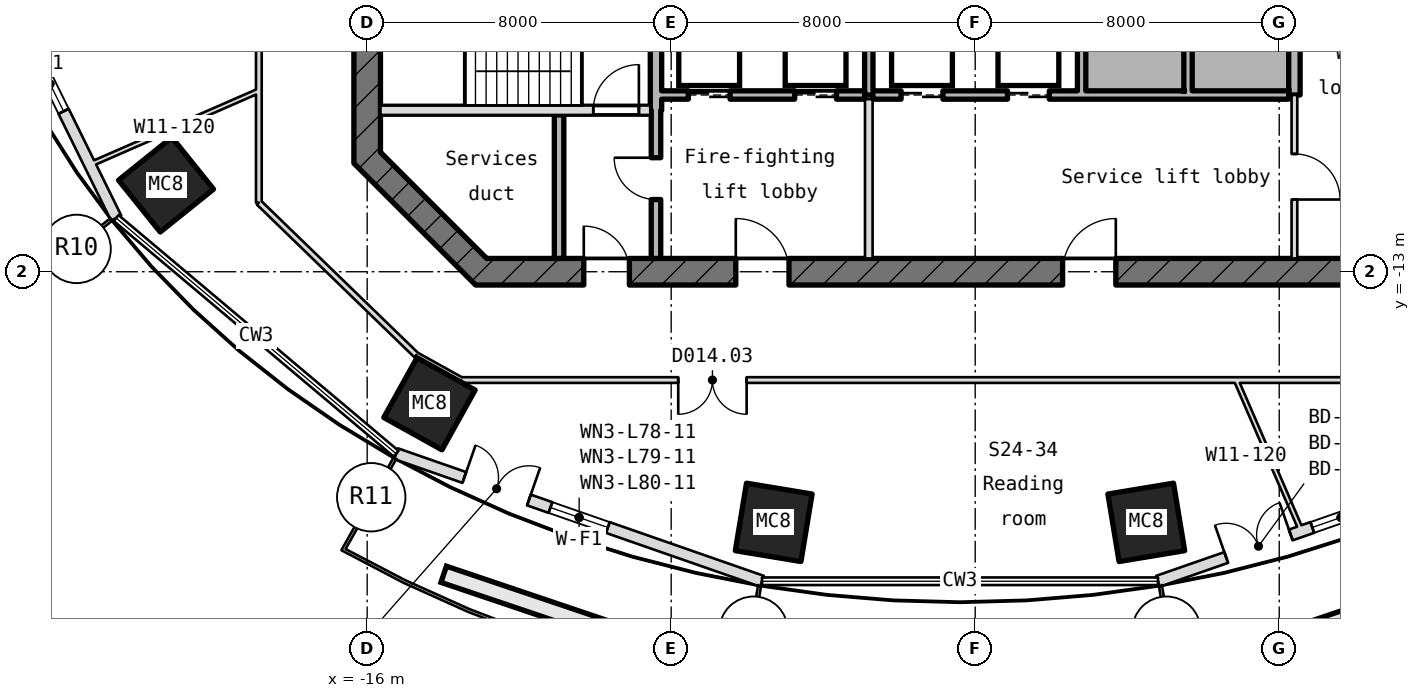
"""IFC4 building model, lengths in metres.
Left out: names, types, materials, properties, quantities, classifications, styles, units other than length and angle.
Written with IfcOpenShell. Run it as: python <this file> out.ifc"""

import sys

from ifc_helpers import new_model, si_unit, direction, frame, frame_2d, origin, origin_2d, place, context, subcontext, project, spatial, rectangle, hollow_rectangle, extrude, element, fill, save


model = new_model("IFC4")
c1 = context("Model", 3, precision=1e-05, world=origin(), true_north=direction((0.0, 1.0)))
c2 = subcontext(c1, "Body", "Model", "MODEL_VIEW")
j1 = project(units=[si_unit("LENGTHUNIT", "METRE"), si_unit("PLANEANGLEUNIT", "RADIAN")], contexts=[c1])
p1 = place(None, origin())
s1 = spatial("IfcSite", under=j1, at=p1, CompositionType="ELEMENT")
p2 = place(p1, origin())
s2 = spatial("IfcBuilding", under=s1, at=p2, CompositionType="ELEMENT")
p3 = place(p2, frame((0.0, 0.0, 346.75)))
s3 = spatial("IfcBuildingStorey", under=s2, at=p3, CompositionType="ELEMENT", Elevation=346.75)
for number, where, z_axis, x_axis in (
    (1, (-21.292, -10.709, -0.18), (0.0, 0.0, 1.0), (-0.626, 0.78, 0.0)),
    (2, (-14.36, -16.474, -0.18), (0.0, 0.0, 1.0), (-0.874, 0.486, 0.0)),
    (3, (-5.302, -19.594, -0.18), (0.0, 0.0, 1.0), (-0.987, 0.163, 0.0)),
    (4, (4.502, -19.594, -0.18), (0.0, 0.0, 1.0), (-0.987, -0.163, 0.0)),
):
    element("IfcColumn", number, at=place(p3, frame(where, z_axis=z_axis, x_axis=x_axis)), inside=s3, PredefinedType="COLUMN", context=c2, shape_type="SweptSolid", body=[
        extrude(hollow_rectangle(XDim=1.75, YDim=1.8, WallThickness=0.055, at=origin_2d()), origin(), (0.0, 0.0, 1.0), 4.15),
    ])
p4 = place(p3, frame((-26.594, -3.485, 0.0), z_axis=(0.0, 0.0, 1.0), x_axis=(0.441581239579, -0.897221270842, 0.0)))
e5 = element("IfcWall", 5, at=p4, inside=s3, PredefinedType="SOLIDWALL", context=c2, shape_type="SweptSolid", body=[
    extrude(rectangle(XDim=9.03, YDim=0.3, at=frame_2d((4.515, 0.0))), origin(), (0.0, 0.0, 1.0), 3.97),
])
p5 = place(p4, frame((1.9, 0.0, 0.0)))
e6 = element("IfcOpeningElement", 6, at=p5, cuts=e5, PredefinedType="OPENING", context=c2, shape_type="SweptSolid", body=[
    extrude(rectangle(XDim=1.8, YDim=2.4, at=frame_2d((0.9, 1.2))), frame((0.0, 0.16, 0.0), z_axis=(0.0, -1.0, 0.0), x_axis=(1.0, 0.0, 0.0)), (0.0, 0.0, 1.0), 0.32),
])
p6 = place(p4, frame((4.3, 0.0, 0.9)))
e7 = element("IfcOpeningElement", 7, at=p6, cuts=e5, PredefinedType="OPENING", context=c2, shape_type="SweptSolid", body=[
    extrude(rectangle(XDim=1.6, YDim=1.5, at=frame_2d((0.8, 0.75))), frame((0.0, 0.16, 0.0), z_axis=(0.0, -1.0, 0.0), x_axis=(1.0, 0.0, 0.0)), (0.0, 0.0, 1.0), 0.32),
])
p7 = place(p3, frame((-15.238, -17.788, 0.0), z_axis=(0.0, 0.0, 1.0), x_axis=(0.944272378507, -0.329165118428, 0.0)))
e8 = element("IfcWall", 8, at=p7, inside=s3, PredefinedType="SOLIDWALL", context=c2, shape_type="SweptSolid", body=[
    extrude(rectangle(XDim=10.195, YDim=0.3, at=frame_2d((5.098, 0.0))), origin(), (0.0, 0.0, 1.0), 3.97),
])
p8 = place(p7, frame((1.9, 0.0, 0.0)))
e9 = element("IfcOpeningElement", 9, at=p8, cuts=e8, PredefinedType="OPENING", context=c2, shape_type="SweptSolid", body=[
    extrude(rectangle(XDim=1.8, YDim=2.4, at=frame_2d((0.9, 1.2))), frame((0.0, 0.16, 0.0), z_axis=(0.0, -1.0, 0.0), x_axis=(1.0, 0.0, 0.0)), (0.0, 0.0, 1.0), 0.32),
])
p9 = place(p7, frame((4.3, 0.0, 0.9)))
e10 = element("IfcOpeningElement", 10, at=p9, cuts=e8, PredefinedType="OPENING", context=c2, shape_type="SweptSolid", body=[
    extrude(rectangle(XDim=1.6, YDim=1.5, at=frame_2d((0.8, 0.75))), frame((0.0, 0.16, 0.0), z_axis=(0.0, -1.0, 0.0), x_axis=(1.0, 0.0, 0.0)), (0.0, 0.0, 1.0), 0.32),
])
p10 = place(p3, frame((4.81, -21.144, 0.0), z_axis=(0.0, 0.0, 1.0), x_axis=(0.944274972987, 0.329157675576, 0.0)))
e11 = element("IfcWall", 11, at=p10, inside=s3, PredefinedType="SOLIDWALL", context=c2, shape_type="SweptSolid", body=[
    extrude(rectangle(XDim=10.196, YDim=0.3, at=frame_2d((5.098, 0.0))), origin(), (0.0, 0.0, 1.0), 3.97),
])
p11 = place(p10, frame((1.9, 0.0, 0.0)))
e12 = element("IfcOpeningElement", 12, at=p11, cuts=e11, PredefinedType="OPENING", context=c2, shape_type="SweptSolid", body=[
    extrude(rectangle(XDim=1.8, YDim=2.4, at=frame_2d((0.9, 1.2))), frame((0.0, 0.16, 0.0), z_axis=(0.0, -1.0, 0.0), x_axis=(1.0, 0.0, 0.0)), (0.0, 0.0, 1.0), 0.32),
])
p12 = place(p10, frame((4.3, 0.0, 0.9)))
e13 = element("IfcOpeningElement", 13, at=p12, cuts=e11, PredefinedType="OPENING", context=c2, shape_type="SweptSolid", body=[
    extrude(rectangle(XDim=1.6, YDim=1.5, at=frame_2d((0.8, 0.75))), frame((0.0, 0.16, 0.0), z_axis=(0.0, -1.0, 0.0), x_axis=(1.0, 0.0, 0.0)), (0.0, 0.0, 1.0), 0.32),
])
p13 = place(p3, frame((-16.0, 10.145, -0.18), z_axis=(0.0, 0.0, 1.0), x_axis=(0.0, -1.0, 0.0)))
e14 = element("IfcWall", 14, at=p13, inside=s3, PredefinedType="SHEAR", context=c2, shape_type="SweptSolid", body=[
    extrude(rectangle(XDim=20.29, YDim=0.7, at=frame_2d((10.145, 0.0))), origin(), (0.0, 0.0, 1.0), 4.15),
])
p14 = place(p13, frame((8.945, 0.0, 0.18)))
e15 = element("IfcOpeningElement", 15, at=p14, cuts=e14, PredefinedType="OPENING", context=c2, shape_type="SweptSolid", body=[
    extrude(rectangle(XDim=2.4, YDim=2.1, at=frame_2d((1.2, 1.05))), frame((0.0, 0.36, 0.0), z_axis=(0.0, -1.0, 0.0), x_axis=(1.0, 0.0, 0.0)), (0.0, 0.0, 1.0), 0.72),
])
p15 = place(p13, frame((5.545, 0.0, 0.18)))
e16 = element("IfcOpeningElement", 16, at=p15, cuts=e14, PredefinedType="OPENING", context=c2, shape_type="SweptSolid", body=[
    extrude(rectangle(XDim=1.2, YDim=2.1, at=frame_2d((0.6, 1.05))), frame((0.0, 0.36, 0.0), z_axis=(0.0, -1.0, 0.0), x_axis=(1.0, 0.0, 0.0)), (0.0, 0.0, 1.0), 0.72),
])
p16 = place(p3, frame((-16.103, -9.897, -0.18), z_axis=(0.0, 0.0, 1.0), x_axis=(0.707106781187, -0.707106781187, 0.0)))
e17 = element("IfcWall", 17, at=p16, inside=s3, PredefinedType="SHEAR", context=c2, shape_type="SweptSolid", body=[
    extrude(rectangle(XDim=4.533, YDim=0.7, at=frame_2d((2.266, 0.0))), origin(), (0.0, 0.0, 1.0), 4.15),
])
p17 = place(p3, frame((-13.145, -13.0, -0.18), z_axis=(0.0, 0.0, 1.0), x_axis=(1.0, 0.0, 0.0)))
e18 = element("IfcWall", 18, at=p17, inside=s3, PredefinedType="SHEAR", context=c2, shape_type="SweptSolid", body=[
    extrude(rectangle(XDim=26.29, YDim=0.7, at=frame_2d((13.145, 0.0))), origin(), (0.0, 0.0, 1.0), 4.15),
])
p18 = place(p17, frame((2.845, 0.0, 0.18)))
e19 = element("IfcOpeningElement", 19, at=p18, cuts=e18, PredefinedType="OPENING", context=c2, shape_type="SweptSolid", body=[
    extrude(rectangle(XDim=1.2, YDim=2.1, at=frame_2d((0.6, 1.05))), frame((0.0, 0.36, 0.0), z_axis=(0.0, -1.0, 0.0), x_axis=(1.0, 0.0, 0.0)), (0.0, 0.0, 1.0), 0.72),
])
p19 = place(p17, frame((6.845, 0.0, 0.18)))
e20 = element("IfcOpeningElement", 20, at=p19, cuts=e18, PredefinedType="OPENING", context=c2, shape_type="SweptSolid", body=[
    extrude(rectangle(XDim=1.4, YDim=2.1, at=frame_2d((0.7, 1.05))), frame((0.0, 0.36, 0.0), z_axis=(0.0, -1.0, 0.0), x_axis=(1.0, 0.0, 0.0)), (0.0, 0.0, 1.0), 0.72),
])
p20 = place(p17, frame((15.445, 0.0, 0.18)))
e21 = element("IfcOpeningElement", 21, at=p20, cuts=e18, PredefinedType="OPENING", context=c2, shape_type="SweptSolid", body=[
    extrude(rectangle(XDim=1.4, YDim=2.1, at=frame_2d((0.7, 1.05))), frame((0.0, 0.36, 0.0), z_axis=(0.0, -1.0, 0.0), x_axis=(1.0, 0.0, 0.0)), (0.0, 0.0, 1.0), 0.72),
])
p21 = place(p3, frame((-15.65, -8.75, -0.18), z_axis=(0.0, 0.0, 1.0), x_axis=(1.0, 0.0, 0.0)))
e22 = element("IfcWall", 22, at=p21, inside=s3, PredefinedType="SHEAR", context=c2, shape_type="SweptSolid", body=[
    extrude(rectangle(XDim=7.1, YDim=0.25, at=frame_2d((3.55, 0.0))), origin(), (0.0, 0.0, 1.0), 4.15),
])
p22 = place(p21, frame((5.6, 0.0, 0.18)))
e23 = element("IfcOpeningElement", 23, at=p22, cuts=e22, PredefinedType="OPENING", context=c2, shape_type="SweptSolid", body=[
    extrude(rectangle(XDim=1.2, YDim=2.1, at=frame_2d((0.6, 1.05))), frame((0.0, 0.135, 0.0), z_axis=(0.0, -1.0, 0.0), x_axis=(1.0, 0.0, 0.0)), (0.0, 0.0, 1.0), 0.27),
])
p23 = place(p3, frame((-8.25, -8.35, 0.0), z_axis=(0.0, 0.0, 1.0), x_axis=(1.0, 0.0, 0.0)))
e24 = element("IfcWall", 24, at=p23, inside=s3, PredefinedType="STANDARD", context=c2, shape_type="SweptSolid", body=[
    extrude(rectangle(XDim=5.34, YDim=0.22, at=frame_2d((2.67, 0.0))), origin(), (0.0, 0.0, 1.0), 3.97),
])
p24 = place(p23, frame((0.7, 0.0, 0.0)))
e25 = element("IfcOpeningElement", 25, at=p24, cuts=e24, PredefinedType="OPENING", context=c2, shape_type="SweptSolid", body=[
    extrude(rectangle(XDim=1.1, YDim=2.1, at=frame_2d((0.55, 1.05))), frame((0.0, 0.12, 0.0), z_axis=(0.0, -1.0, 0.0), x_axis=(1.0, 0.0, 0.0)), (0.0, 0.0, 1.0), 0.24),
])
p25 = place(p23, frame((3.5, 0.0, 0.0)))
e26 = element("IfcOpeningElement", 26, at=p25, cuts=e24, PredefinedType="OPENING", context=c2, shape_type="SweptSolid", body=[
    extrude(rectangle(XDim=1.1, YDim=2.1, at=frame_2d((0.55, 1.05))), frame((0.0, 0.12, 0.0), z_axis=(0.0, -1.0, 0.0), x_axis=(1.0, 0.0, 0.0)), (0.0, 0.0, 1.0), 0.24),
])
p26 = place(p3, frame((-2.69, -8.35, 0.0), z_axis=(0.0, 0.0, 1.0), x_axis=(1.0, 0.0, 0.0)))
e27 = element("IfcWall", 27, at=p26, inside=s3, PredefinedType="STANDARD", context=c2, shape_type="SweptSolid", body=[
    extrude(rectangle(XDim=10.94, YDim=0.22, at=frame_2d((5.47, 0.0))), origin(), (0.0, 0.0, 1.0), 3.97),
])
p27 = place(p26, frame((0.74, 0.0, 0.0)))
e28 = element("IfcOpeningElement", 28, at=p27, cuts=e27, PredefinedType="OPENING", context=c2, shape_type="SweptSolid", body=[
    extrude(rectangle(XDim=1.1, YDim=2.1, at=frame_2d((0.55, 1.05))), frame((0.0, 0.12, 0.0), z_axis=(0.0, -1.0, 0.0), x_axis=(1.0, 0.0, 0.0)), (0.0, 0.0, 1.0), 0.24),
])
p28 = place(p26, frame((3.54, 0.0, 0.0)))
e29 = element("IfcOpeningElement", 29, at=p28, cuts=e27, PredefinedType="OPENING", context=c2, shape_type="SweptSolid", body=[
    extrude(rectangle(XDim=1.1, YDim=2.1, at=frame_2d((0.55, 1.05))), frame((0.0, 0.12, 0.0), z_axis=(0.0, -1.0, 0.0), x_axis=(1.0, 0.0, 0.0)), (0.0, 0.0, 1.0), 0.24),
])
p29 = place(p3, frame((-10.95, -12.65, 0.0), z_axis=(0.0, 0.0, 1.0), x_axis=(0.0, 1.0, 0.0)))
e30 = element("IfcWall", 30, at=p29, inside=s3, PredefinedType="STANDARD", context=c2, shape_type="SweptSolid", body=[
    extrude(rectangle(XDim=3.775, YDim=0.25, at=frame_2d((1.887, 0.0))), origin(), (0.0, 0.0, 1.0), 3.97),
])
p30 = place(p3, frame((-8.4, -12.65, 0.0), z_axis=(0.0, 0.0, 1.0), x_axis=(0.0, 1.0, 0.0)))
e31 = element("IfcWall", 31, at=p30, inside=s3, PredefinedType="STANDARD", context=c2, shape_type="SweptSolid", body=[
    extrude(rectangle(XDim=3.9, YDim=0.25, at=frame_2d((1.95, 0.0))), origin(), (0.0, 0.0, 1.0), 3.97),
])
p31 = place(p30, frame((1.55, 0.0, 0.0)))
e32 = element("IfcOpeningElement", 32, at=p31, cuts=e31, PredefinedType="OPENING", context=c2, shape_type="SweptSolid", body=[
    extrude(rectangle(XDim=1.1, YDim=2.1, at=frame_2d((0.55, 1.05))), frame((0.0, 0.135, 0.0), z_axis=(0.0, -1.0, 0.0), x_axis=(1.0, 0.0, 0.0)), (0.0, 0.0, 1.0), 0.27),
])
p32 = place(p3, frame((-8.4, -8.75, -0.18), z_axis=(0.0, 0.0, 1.0), x_axis=(0.0, 1.0, 0.0)))
e33 = element("IfcWall", 33, at=p32, inside=s3, PredefinedType="SHEAR", context=c2, shape_type="SweptSolid", body=[
    extrude(rectangle(XDim=4.175, YDim=0.3, at=frame_2d((2.087, 0.0))), origin(), (0.0, 0.0, 1.0), 4.15),
])
p33 = place(p3, frame((-2.8, -12.65, 0.0), z_axis=(0.0, 0.0, 1.0), x_axis=(0.0, 1.0, 0.0)))
e34 = element("IfcWall", 34, at=p33, inside=s3, PredefinedType="PARTITIONING", context=c2, shape_type="SweptSolid", body=[
    extrude(rectangle(XDim=4.19, YDim=0.2, at=frame_2d((2.095, 0.0))), origin(), (0.0, 0.0, 1.0), 3.97),
])
p34 = place(p3, frame((-2.8, -8.35, 0.0), z_axis=(0.0, 0.0, 1.0), x_axis=(0.0, 1.0, 0.0)))
e35 = element("IfcWall", 35, at=p34, inside=s3, PredefinedType="STANDARD", context=c2, shape_type="SweptSolid", body=[
    extrude(rectangle(XDim=2.89, YDim=0.22, at=frame_2d((1.445, 0.0))), origin(), (0.0, 0.0, 1.0), 3.97),
])
for number, where, z_axis, x_axis in (
    (36, (2.8, -8.24, 0.0), (0.0, 0.0, 1.0), (0.0, 1.0, 0.0)),
    (37, (5.6, -8.24, 0.0), (0.0, 0.0, 1.0), (0.0, 1.0, 0.0)),
):
    element("IfcWall", number, at=place(p3, frame(where, z_axis=z_axis, x_axis=x_axis)), inside=s3, PredefinedType="STANDARD", context=c2, shape_type="SweptSolid", body=[
        extrude(rectangle(XDim=2.78, YDim=0.22, at=frame_2d((1.39, 0.0))), origin(), (0.0, 0.0, 1.0), 3.97),
    ])
p35 = place(p3, frame((8.4, -12.65, 0.0), z_axis=(0.0, 0.0, 1.0), x_axis=(0.0, 1.0, 0.0)))
e38 = element("IfcWall", 38, at=p35, inside=s3, PredefinedType="PARTITIONING", context=c2, shape_type="SweptSolid", body=[
    extrude(rectangle(XDim=4.3, YDim=0.15, at=frame_2d((2.15, 0.0))), origin(), (0.0, 0.0, 1.0), 3.97),
])
p36 = place(p35, frame((1.55, 0.0, 0.0)))
e39 = element("IfcOpeningElement", 39, at=p36, cuts=e38, PredefinedType="OPENING", context=c2, shape_type="SweptSolid", body=[
    extrude(rectangle(XDim=1.2, YDim=2.1, at=frame_2d((0.6, 1.05))), frame((0.0, 0.085, 0.0), z_axis=(0.0, -1.0, 0.0), x_axis=(1.0, 0.0, 0.0)), (0.0, 0.0, 1.0), 0.17),
])
p37 = place(p3, frame((8.4, -8.35, -0.18), z_axis=(0.0, 0.0, 1.0), x_axis=(0.0, 1.0, 0.0)))
e40 = element("IfcWall", 40, at=p37, inside=s3, PredefinedType="SHEAR", context=c2, shape_type="SweptSolid", body=[
    extrude(rectangle(XDim=5.85, YDim=0.3, at=frame_2d((2.925, 0.0))), origin(), (0.0, 0.0, 1.0), 4.15),
])
p38 = place(p3, frame((-18.85, -11.18, 0.0), z_axis=(0.0, 0.0, 1.0), x_axis=(0.0, 1.0, 0.0)))
e41 = element("IfcWall", 41, at=p38, inside=s3, PredefinedType="PARTITIONING", context=c2, shape_type="SweptSolid", body=[
    extrude(rectangle(XDim=22.361, YDim=0.15, at=frame_2d((11.18, 0.0))), origin(), (0.0, 0.0, 1.0), 3.97),
])
p39 = place(p38, frame((9.02, 0.0, 0.0)))
e42 = element("IfcOpeningElement", 42, at=p39, cuts=e41, PredefinedType="OPENING", context=c2, shape_type="SweptSolid", body=[
    extrude(rectangle(XDim=0.95, YDim=2.1, at=frame_2d((0.475, 1.05))), frame((0.0, 0.085, 0.0), z_axis=(0.0, -1.0, 0.0), x_axis=(1.0, 0.0, 0.0)), (0.0, 0.0, 1.0), 0.17),
])
p40 = place(p3, frame((-18.85, -8.239, 0.0), z_axis=(0.0, 0.0, 1.0), x_axis=(-0.916287746966, -0.400520617148, 0.0)))
e43 = element("IfcWall", 43, at=p40, inside=s3, PredefinedType="PARTITIONING", context=c2, shape_type="SweptSolid", body=[
    extrude(rectangle(XDim=4.853, YDim=0.12, at=frame_2d((2.427, 0.0))), origin(), (0.0, 0.0, 1.0), 3.97),
])
p41 = place(p3, frame((-14.707, -15.195, 0.0), z_axis=(0.0, 0.0, 1.0), x_axis=(-0.718211802801, 0.695824551391, 0.0)))
e44 = element("IfcWall", 44, at=p41, inside=s3, PredefinedType="PARTITIONING", context=c2, shape_type="SweptSolid", body=[
    extrude(rectangle(XDim=5.769, YDim=0.15, at=frame_2d((2.885, 0.0))), origin(), (0.0, 0.0, 1.0), 3.97),
])
p42 = place(p3, frame((-13.528, -15.85, 0.0), z_axis=(0.0, 0.0, 1.0), x_axis=(-0.874029209117, 0.485873380224, 0.0)))
e45 = element("IfcWall", 45, at=p42, inside=s3, PredefinedType="PARTITIONING", context=c2, shape_type="SweptSolid", body=[
    extrude(rectangle(XDim=1.349, YDim=0.15, at=frame_2d((0.675, 0.0))), origin(), (0.0, 0.0, 1.0), 3.97),
])
p43 = place(p3, frame((6.865, -15.85, 0.0), z_axis=(0.0, 0.0, 1.0), x_axis=(0.397444614723, -0.917626164747, 0.0)))
e46 = element("IfcWall", 46, at=p43, inside=s3, PredefinedType="PARTITIONING", context=c2, shape_type="SweptSolid", body=[
    extrude(rectangle(XDim=4.334, YDim=0.12, at=frame_2d((2.167, 0.0))), origin(), (0.0, 0.0, 1.0), 3.97),
])
p44 = place(p3, frame((12.728, -15.85, 0.0), z_axis=(0.0, 0.0, 1.0), x_axis=(-1.0, 0.0, 0.0)))
e47 = element("IfcWall", 47, at=p44, inside=s3, PredefinedType="PARTITIONING", context=c2, shape_type="SweptSolid", body=[
    extrude(rectangle(XDim=26.255, YDim=0.15, at=frame_2d((13.127, 0.0))), origin(), (0.0, 0.0, 1.0), 3.97),
])
p45 = place(p44, frame((18.742, 0.0, 0.0)))
e48 = element("IfcOpeningElement", 48, at=p45, cuts=e47, PredefinedType="OPENING", context=c2, shape_type="SweptSolid", body=[
    extrude(rectangle(XDim=1.8, YDim=2.1, at=frame_2d((0.9, 1.05))), frame((0.0, 0.085, 0.0), z_axis=(0.0, -1.0, 0.0), x_axis=(1.0, 0.0, 0.0)), (0.0, 0.0, 1.0), 0.17),
])
p46 = place(p6, origin())
e49 = element("IfcWindow", 49, at=p46, inside=s3, PartitioningType="SINGLE_PANEL", PredefinedType="WINDOW", context=c2, shape_type="SweptSolid", body=[
    extrude(rectangle(XDim=1.6, YDim=1.5, at=frame_2d((0.8, 0.75))), frame((0.0, 0.03, 0.0), z_axis=(0.0, -1.0, 0.0), x_axis=(1.0, 0.0, 0.0)), (0.0, 0.0, 1.0), 0.06),
])
fill(e7, e49)
p47 = place(p8, origin())
e50 = element("IfcDoor", 50, at=p47, inside=s3, OperationType="SINGLE_SWING_LEFT", PredefinedType="DOOR", context=c2, shape_type="SweptSolid", body=[
    extrude(rectangle(XDim=1.8, YDim=2.4, at=frame_2d((0.9, 1.2))), frame((0.0, 0.025, 0.0), z_axis=(0.0, -1.0, 0.0), x_axis=(1.0, 0.0, 0.0)), (0.0, 0.0, 1.0), 0.05),
])
fill(e9, e50)
p48 = place(p9, origin())
e51 = element("IfcWindow", 51, at=p48, inside=s3, PartitioningType="SINGLE_PANEL", PredefinedType="WINDOW", context=c2, shape_type="SweptSolid", body=[
    extrude(rectangle(XDim=1.6, YDim=1.5, at=frame_2d((0.8, 0.75))), frame((0.0, 0.03, 0.0), z_axis=(0.0, -1.0, 0.0), x_axis=(1.0, 0.0, 0.0)), (0.0, 0.0, 1.0), 0.06),
])
fill(e10, e51)
p49 = place(p11, origin())
e52 = element("IfcDoor", 52, at=p49, inside=s3, OperationType="SINGLE_SWING_LEFT", PredefinedType="DOOR", context=c2, shape_type="SweptSolid", body=[
    extrude(rectangle(XDim=1.8, YDim=2.4, at=frame_2d((0.9, 1.2))), frame((0.0, 0.025, 0.0), z_axis=(0.0, -1.0, 0.0), x_axis=(1.0, 0.0, 0.0)), (0.0, 0.0, 1.0), 0.05),
])
fill(e12, e52)
p50 = place(p12, origin())
e53 = element("IfcWindow", 53, at=p50, inside=s3, PartitioningType="SINGLE_PANEL", PredefinedType="WINDOW", context=c2, shape_type="SweptSolid", body=[
    extrude(rectangle(XDim=1.6, YDim=1.5, at=frame_2d((0.8, 0.75))), frame((0.0, 0.03, 0.0), z_axis=(0.0, -1.0, 0.0), x_axis=(1.0, 0.0, 0.0)), (0.0, 0.0, 1.0), 0.06),
])
fill(e13, e53)
p51 = place(p24, origin())
e54 = element("IfcDoor", 54, at=p51, inside=s3, OperationType="DOUBLE_DOOR_SLIDING", PredefinedType="DOOR", context=c2, shape_type="SweptSolid", body=[
    extrude(rectangle(XDim=1.1, YDim=2.1, at=frame_2d((0.55, 1.05))), frame((0.0, 0.025, 0.0), z_axis=(0.0, -1.0, 0.0), x_axis=(1.0, 0.0, 0.0)), (0.0, 0.0, 1.0), 0.05),
])
fill(e25, e54)
p52 = place(p25, origin())
e55 = element("IfcDoor", 55, at=p52, inside=s3, OperationType="DOUBLE_DOOR_SLIDING", PredefinedType="DOOR", context=c2, shape_type="SweptSolid", body=[
    extrude(rectangle(XDim=1.1, YDim=2.1, at=frame_2d((0.55, 1.05))), frame((0.0, 0.025, 0.0), z_axis=(0.0, -1.0, 0.0), x_axis=(1.0, 0.0, 0.0)), (0.0, 0.0, 1.0), 0.05),
])
fill(e26, e55)
p53 = place(p27, origin())
e56 = element("IfcDoor", 56, at=p53, inside=s3, OperationType="DOUBLE_DOOR_SLIDING", PredefinedType="DOOR", context=c2, shape_type="SweptSolid", body=[
    extrude(rectangle(XDim=1.1, YDim=2.1, at=frame_2d((0.55, 1.05))), frame((0.0, 0.025, 0.0), z_axis=(0.0, -1.0, 0.0), x_axis=(1.0, 0.0, 0.0)), (0.0, 0.0, 1.0), 0.05),
])
fill(e28, e56)
p54 = place(p28, origin())
e57 = element("IfcDoor", 57, at=p54, inside=s3, OperationType="DOUBLE_DOOR_SLIDING", PredefinedType="DOOR", context=c2, shape_type="SweptSolid", body=[
    extrude(rectangle(XDim=1.1, YDim=2.1, at=frame_2d((0.55, 1.05))), frame((0.0, 0.025, 0.0), z_axis=(0.0, -1.0, 0.0), x_axis=(1.0, 0.0, 0.0)), (0.0, 0.0, 1.0), 0.05),
])
fill(e29, e57)
p55 = place(p22, origin())
e58 = element("IfcDoor", 58, at=p55, inside=s3, OperationType="SINGLE_SWING_RIGHT", PredefinedType="DOOR", context=c2, shape_type="SweptSolid", body=[
    extrude(rectangle(XDim=1.2, YDim=2.1, at=frame_2d((0.6, 1.05))), frame((0.0, 0.025, 0.0), z_axis=(0.0, -1.0, 0.0), x_axis=(1.0, 0.0, 0.0)), (0.0, 0.0, 1.0), 0.05),
])
fill(e23, e58)
p56 = place(p31, origin())
e59 = element("IfcDoor", 59, at=p56, inside=s3, OperationType="SINGLE_SWING_RIGHT", PredefinedType="DOOR", context=c2, shape_type="SweptSolid", body=[
    extrude(rectangle(XDim=1.1, YDim=2.1, at=frame_2d((0.55, 1.05))), frame((0.0, 0.025, 0.0), z_axis=(0.0, -1.0, 0.0), x_axis=(1.0, 0.0, 0.0)), (0.0, 0.0, 1.0), 0.05),
])
fill(e32, e59)
p57 = place(p18, origin())
e60 = element("IfcDoor", 60, at=p57, inside=s3, OperationType="SINGLE_SWING_RIGHT", PredefinedType="DOOR", context=c2, shape_type="SweptSolid", body=[
    extrude(rectangle(XDim=1.2, YDim=2.1, at=frame_2d((0.6, 1.05))), frame((0.0, 0.025, 0.0), z_axis=(0.0, -1.0, 0.0), x_axis=(1.0, 0.0, 0.0)), (0.0, 0.0, 1.0), 0.05),
])
fill(e19, e60)
p58 = place(p19, origin())
e61 = element("IfcDoor", 61, at=p58, inside=s3, OperationType="SINGLE_SWING_RIGHT", PredefinedType="DOOR", context=c2, shape_type="SweptSolid", body=[
    extrude(rectangle(XDim=1.4, YDim=2.1, at=frame_2d((0.7, 1.05))), frame((0.0, 0.025, 0.0), z_axis=(0.0, -1.0, 0.0), x_axis=(1.0, 0.0, 0.0)), (0.0, 0.0, 1.0), 0.05),
])
fill(e20, e61)
p59 = place(p20, origin())
e62 = element("IfcDoor", 62, at=p59, inside=s3, OperationType="SINGLE_SWING_RIGHT", PredefinedType="DOOR", context=c2, shape_type="SweptSolid", body=[
    extrude(rectangle(XDim=1.4, YDim=2.1, at=frame_2d((0.7, 1.05))), frame((0.0, 0.025, 0.0), z_axis=(0.0, -1.0, 0.0), x_axis=(1.0, 0.0, 0.0)), (0.0, 0.0, 1.0), 0.05),
])
fill(e21, e62)
p60 = place(p36, frame((1.2, 0.0, 0.0), z_axis=(0.0, 0.0, 1.0), x_axis=(-1.0, 0.0, 0.0)))
e63 = element("IfcDoor", 63, at=p60, inside=s3, OperationType="SINGLE_SWING_LEFT", PredefinedType="DOOR", context=c2, shape_type="SweptSolid", body=[
    extrude(rectangle(XDim=1.2, YDim=2.1, at=frame_2d((0.6, 1.05))), frame((0.0, 0.025, 0.0), z_axis=(0.0, -1.0, 0.0), x_axis=(1.0, 0.0, 0.0)), (0.0, 0.0, 1.0), 0.05),
])
fill(e39, e63)
p61 = place(p45, origin())
e64 = element("IfcDoor", 64, at=p61, inside=s3, OperationType="DOUBLE_DOOR_SINGLE_SWING", PredefinedType="DOOR", context=c2, shape_type="SweptSolid", body=[
    extrude(rectangle(XDim=1.8, YDim=2.1, at=frame_2d((0.9, 1.05))), frame((0.0, 0.025, 0.0), z_axis=(0.0, -1.0, 0.0), x_axis=(1.0, 0.0, 0.0)), (0.0, 0.0, 1.0), 0.05),
])
fill(e48, e64)
save(model, sys.argv[1])
